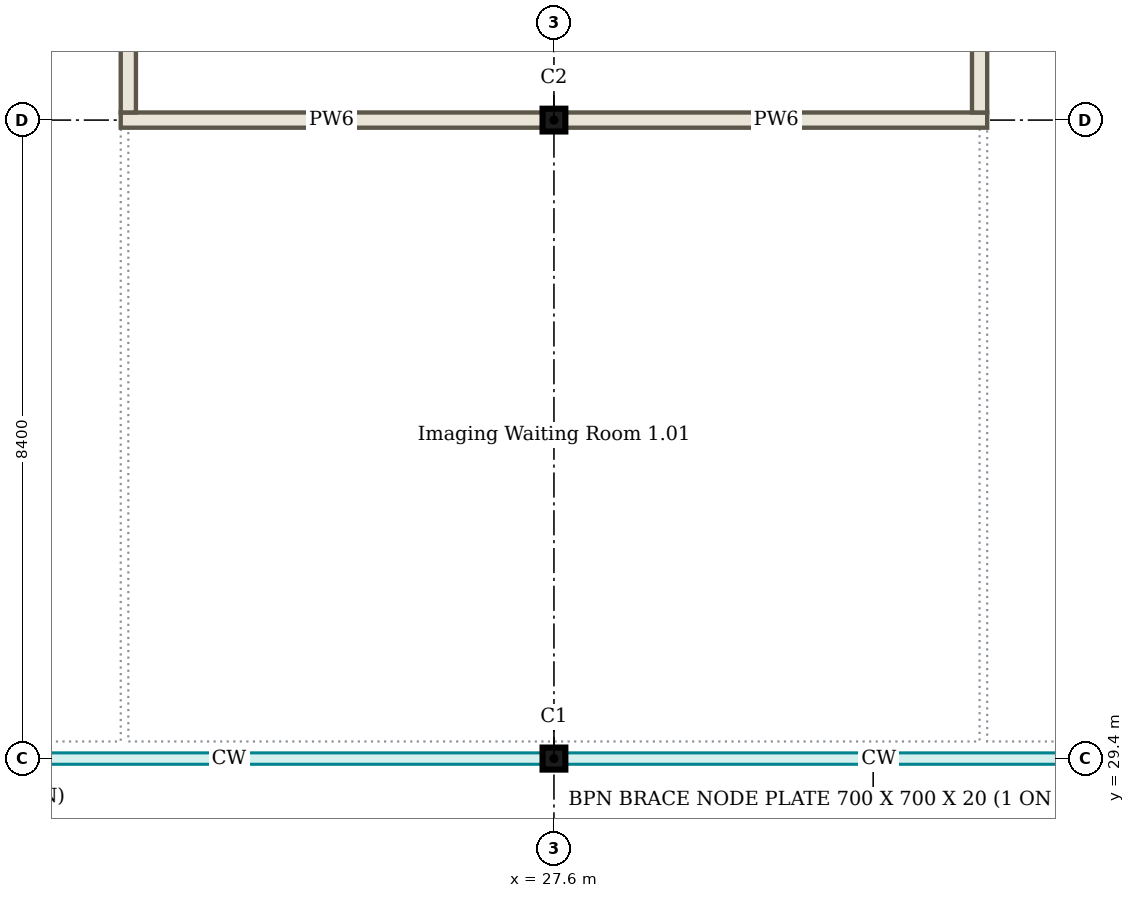
"""IFC4 building model, lengths in metres.
Left out: names, types, materials, properties, quantities, classifications, styles, units other than length and angle.
Written with IfcOpenShell. Run it as: python <this file> out.ifc"""

import sys

from ifc_helpers import new_model, si_unit, direction, frame, frame_2d, origin, origin_2d, place, context, subcontext, project, spatial, rectangle, i_section, extrude, element, save


model = new_model("IFC4")
c1 = context("Model", 3, precision=1e-05, world=origin(), true_north=direction((0.0, 1.0)))
c2 = subcontext(c1, "Body", "Model", "MODEL_VIEW")
j1 = project(units=[si_unit("LENGTHUNIT", "METRE"), si_unit("PLANEANGLEUNIT", "RADIAN")], contexts=[c1])
p1 = place(None, origin())
s1 = spatial("IfcSite", under=j1, at=p1, CompositionType="ELEMENT")
p2 = place(p1, origin())
s2 = spatial("IfcBuilding", under=s1, at=p2, CompositionType="ELEMENT")
p3 = place(p2, frame((0.0, 0.0, 4.5)))
s3 = spatial("IfcBuildingStorey", under=s2, at=p3, CompositionType="ELEMENT", Elevation=4.5)
p4 = place(p3, frame((27.6, 29.4, 0.0), z_axis=(0.0, 0.0, 1.0), x_axis=(1.0, 0.0, 0.0)))
e1 = element("IfcColumn", 1, at=p4, inside=s3, PredefinedType="COLUMN", context=c2, shape_type="SweptSolid", body=[
    extrude(i_section(OverallWidth=0.3, OverallDepth=0.29, WebThickness=0.009, FlangeThickness=0.014, FilletRadius=0.027, at=origin_2d()), origin(), (0.0, 0.0, 1.0), 4.5),
])
p5 = place(p3, frame((27.6, 37.8, 0.0), z_axis=(0.0, 0.0, 1.0), x_axis=(1.0, 0.0, 0.0)))
e2 = element("IfcColumn", 2, at=p5, inside=s3, PredefinedType="COLUMN", context=c2, shape_type="SweptSolid", body=[
    extrude(i_section(OverallWidth=0.3, OverallDepth=0.3, WebThickness=0.011, FlangeThickness=0.019, FilletRadius=0.027, at=origin_2d()), origin(), (0.0, 0.0, 1.0), 4.5),
])
for number, where, z_axis, x_axis in (
    (3, (21.9, 37.8, 0.0), (0.0, 0.0, 1.0), (1.0, 0.0, 0.0)),
    (4, (27.75, 37.8, 0.0), (0.0, 0.0, 1.0), (1.0, 0.0, 0.0)),
):
    element("IfcWall", number, at=place(p3, frame(where, z_axis=z_axis, x_axis=x_axis)), inside=s3, PredefinedType="PARTITIONING", context=c2, shape_type="SweptSolid", body=[
        extrude(rectangle(XDim=5.55, YDim=0.2, at=frame_2d((2.775, 0.0))), origin(), (0.0, 0.0, 1.0), 4.044),
    ])
p6 = place(p3, frame((22.0, 37.9, 0.0), z_axis=(0.0, 0.0, 1.0), x_axis=(0.0, 1.0, 0.0)))
e5 = element("IfcWall", 5, at=p6, inside=s3, PredefinedType="PARTITIONING", context=c2, shape_type="SweptSolid", body=[
    extrude(rectangle(XDim=5.4, YDim=0.2, at=frame_2d((2.7, 0.0))), origin(), (0.0, 0.0, 1.0), 4.35),
])
p7 = place(p6, frame((2.1, 0.0, 0.0)))
e6 = element("IfcOpeningElement", 6, at=p7, cuts=e5, PredefinedType="OPENING", context=c2, shape_type="SweptSolid", body=[
    extrude(rectangle(XDim=1.2, YDim=2.1, at=frame_2d((0.6, 1.05))), frame((0.0, 0.11, 0.0), z_axis=(0.0, -1.0, 0.0), x_axis=(1.0, 0.0, 0.0)), (0.0, 0.0, 1.0), 0.22),
])
p8 = place(p3, frame((33.2, 37.9, 0.0), z_axis=(0.0, 0.0, 1.0), x_axis=(0.0, 1.0, 0.0)))
e7 = element("IfcWall", 7, at=p8, inside=s3, PredefinedType="PARTITIONING", context=c2, shape_type="SweptSolid", body=[
    extrude(rectangle(XDim=5.4, YDim=0.2, at=frame_2d((2.7, 0.0))), origin(), (0.0, 0.0, 1.0), 4.35),
])
save(model, sys.argv[1])
